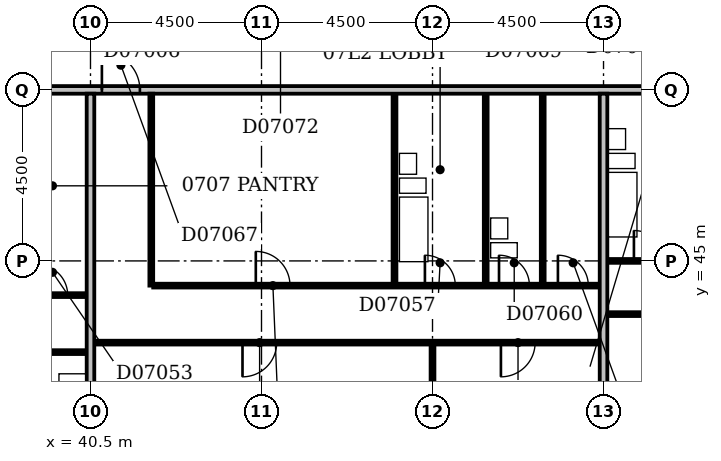
"""IFC4 building model, lengths in metres.
Left out: names, types, materials, properties, quantities, classifications, styles, units other than length and angle.
Written with IfcOpenShell. Run it as: python <this file> out.ifc"""

import sys

from ifc_helpers import new_model, si_unit, direction, frame, frame_2d, origin, place, context, subcontext, project, spatial, rectangle, extrude, element, fill, save


model = new_model("IFC4")
c1 = context("Model", 3, precision=1e-05, world=origin(), true_north=direction((0.0, 1.0)))
c2 = subcontext(c1, "Body", "Model", "MODEL_VIEW")
j1 = project(units=[si_unit("LENGTHUNIT", "METRE"), si_unit("PLANEANGLEUNIT", "RADIAN")], contexts=[c1])
p1 = place(None, origin())
s1 = spatial("IfcSite", under=j1, at=p1, CompositionType="ELEMENT")
p2 = place(p1, origin())
s2 = spatial("IfcBuilding", under=s1, at=p2, CompositionType="ELEMENT")
p3 = place(p2, frame((0.0, 0.0, 36.2)))
s3 = spatial("IfcBuildingStorey", under=s2, at=p3, CompositionType="ELEMENT", Elevation=36.2)
p4 = place(p3, frame((40.5, 36.6, 0.0), z_axis=(0.0, 0.0, 1.0), x_axis=(0.0, 1.0, 0.0)))
e1 = element("IfcWall", 1, at=p4, inside=s3, PredefinedType="PARTITIONING", context=c2, shape_type="SweptSolid", body=[
    extrude(rectangle(XDim=12.8, YDim=0.2, at=frame_2d((6.4, 0.0))), origin(), (0.0, 0.0, 1.0), 3.3),
])
p5 = place(p3, frame((49.5, 36.6, 0.0), z_axis=(0.0, 0.0, 1.0), x_axis=(0.0, 1.0, 0.0)))
e2 = element("IfcWall", 2, at=p5, inside=s3, PredefinedType="PARTITIONING", context=c2, shape_type="SweptSolid", body=[
    extrude(rectangle(XDim=6.2, YDim=0.1, at=frame_2d((3.1, 0.0))), origin(), (0.0, 0.0, 1.0), 3.3),
])
p6 = place(p3, frame((54.0, 36.6, 0.0), z_axis=(0.0, 0.0, 1.0), x_axis=(0.0, 1.0, 0.0)))
e3 = element("IfcWall", 3, at=p6, inside=s3, PredefinedType="PARTITIONING", context=c2, shape_type="SweptSolid", body=[
    extrude(rectangle(XDim=12.8, YDim=0.2, at=frame_2d((6.4, 0.0))), origin(), (0.0, 0.0, 1.0), 2.6),
])
p7 = place(p3, frame((22.6, 42.6, 0.0), z_axis=(0.0, 0.0, 1.0), x_axis=(1.0, 0.0, 0.0)))
e4 = element("IfcWall", 4, at=p7, inside=s3, PredefinedType="PARTITIONING", context=c2, shape_type="SweptSolid", body=[
    extrude(rectangle(XDim=17.8, YDim=0.1, at=frame_2d((8.9, 0.0))), origin(), (0.0, 0.0, 1.0), 3.3),
])
p8 = place(p7, frame((3.9, 0.0, 0.0)))
e5 = element("IfcOpeningElement", 5, at=p8, cuts=e4, PredefinedType="OPENING", context=c2, shape_type="SweptSolid", body=[
    extrude(rectangle(XDim=0.9, YDim=2.1, at=frame_2d((0.45, 1.05))), frame((0.0, 0.062, 0.0), z_axis=(0.0, -1.0, 0.0), x_axis=(1.0, 0.0, 0.0)), (0.0, 0.0, 1.0), 0.124),
])
p9 = place(p7, frame((10.7, 0.0, 0.0)))
e6 = element("IfcOpeningElement", 6, at=p9, cuts=e4, PredefinedType="OPENING", context=c2, shape_type="SweptSolid", body=[
    extrude(rectangle(XDim=0.9, YDim=2.1, at=frame_2d((0.45, 1.05))), frame((0.0, 0.062, 0.0), z_axis=(0.0, -1.0, 0.0), x_axis=(1.0, 0.0, 0.0)), (0.0, 0.0, 1.0), 0.124),
])
p10 = place(p7, frame((14.05, 0.0, 0.0)))
e7 = element("IfcOpeningElement", 7, at=p10, cuts=e4, PredefinedType="OPENING", context=c2, shape_type="SweptSolid", body=[
    extrude(rectangle(XDim=0.9, YDim=2.1, at=frame_2d((0.45, 1.05))), frame((0.0, 0.062, 0.0), z_axis=(0.0, -1.0, 0.0), x_axis=(1.0, 0.0, 0.0)), (0.0, 0.0, 1.0), 0.124),
])
p11 = place(p3, frame((40.6, 42.85, 0.0), z_axis=(0.0, 0.0, 1.0), x_axis=(1.0, 0.0, 0.0)))
e8 = element("IfcWall", 8, at=p11, inside=s3, PredefinedType="PARTITIONING", context=c2, shape_type="SweptSolid", body=[
    extrude(rectangle(XDim=13.3, YDim=0.1, at=frame_2d((6.65, 0.0))), origin(), (0.0, 0.0, 1.0), 3.3),
])
p12 = place(p11, frame((3.9, 0.0, 0.0)))
e9 = element("IfcOpeningElement", 9, at=p12, cuts=e8, PredefinedType="OPENING", context=c2, shape_type="SweptSolid", body=[
    extrude(rectangle(XDim=0.9, YDim=2.1, at=frame_2d((0.45, 1.05))), frame((0.0, 0.062, 0.0), z_axis=(0.0, -1.0, 0.0), x_axis=(1.0, 0.0, 0.0)), (0.0, 0.0, 1.0), 0.124),
])
p13 = place(p11, frame((10.7, 0.0, 0.0)))
e10 = element("IfcOpeningElement", 10, at=p13, cuts=e8, PredefinedType="OPENING", context=c2, shape_type="SweptSolid", body=[
    extrude(rectangle(XDim=0.9, YDim=2.1, at=frame_2d((0.45, 1.05))), frame((0.0, 0.062, 0.0), z_axis=(0.0, -1.0, 0.0), x_axis=(1.0, 0.0, 0.0)), (0.0, 0.0, 1.0), 0.124),
])
p14 = place(p3, frame((54.1, 43.6, 0.0), z_axis=(0.0, 0.0, 1.0), x_axis=(1.0, 0.0, 0.0)))
e11 = element("IfcWall", 11, at=p14, inside=s3, PredefinedType="PARTITIONING", context=c2, shape_type="SweptSolid", body=[
    extrude(rectangle(XDim=8.8, YDim=0.1, at=frame_2d((4.4, 0.0))), origin(), (0.0, 0.0, 1.0), 3.3),
])
p15 = place(p14, frame((1.7, 0.0, 0.0)))
e12 = element("IfcOpeningElement", 12, at=p15, cuts=e11, PredefinedType="OPENING", context=c2, shape_type="SweptSolid", body=[
    extrude(rectangle(XDim=0.9, YDim=2.1, at=frame_2d((0.45, 1.05))), frame((0.0, 0.062, 0.0), z_axis=(0.0, -1.0, 0.0), x_axis=(1.0, 0.0, 0.0)), (0.0, 0.0, 1.0), 0.124),
])
p16 = place(p14, frame((6.2, 0.0, 0.0)))
e13 = element("IfcOpeningElement", 13, at=p16, cuts=e11, PredefinedType="OPENING", context=c2, shape_type="SweptSolid", body=[
    extrude(rectangle(XDim=0.9, YDim=2.1, at=frame_2d((0.45, 1.05))), frame((0.0, 0.062, 0.0), z_axis=(0.0, -1.0, 0.0), x_axis=(1.0, 0.0, 0.0)), (0.0, 0.0, 1.0), 0.124),
])
p17 = place(p3, frame((31.05, 44.1, 0.0), z_axis=(0.0, 0.0, 1.0), x_axis=(1.0, 0.0, 0.0)))
e14 = element("IfcWall", 14, at=p17, inside=s3, PredefinedType="PARTITIONING", context=c2, shape_type="SweptSolid", body=[
    extrude(rectangle(XDim=9.35, YDim=0.1, at=frame_2d((4.675, 0.0))), origin(), (0.0, 0.0, 1.0), 3.3),
])
p18 = place(p17, frame((0.75, 0.0, 0.0)))
e15 = element("IfcOpeningElement", 15, at=p18, cuts=e14, PredefinedType="OPENING", context=c2, shape_type="SweptSolid", body=[
    extrude(rectangle(XDim=0.8, YDim=2.1, at=frame_2d((0.4, 1.05))), frame((0.0, 0.062, 0.0), z_axis=(0.0, -1.0, 0.0), x_axis=(1.0, 0.0, 0.0)), (0.0, 0.0, 1.0), 0.124),
])
p19 = place(p17, frame((8.05, 0.0, 0.0)))
e16 = element("IfcOpeningElement", 16, at=p19, cuts=e14, PredefinedType="OPENING", context=c2, shape_type="SweptSolid", body=[
    extrude(rectangle(XDim=0.8, YDim=2.1, at=frame_2d((0.4, 1.05))), frame((0.0, 0.062, 0.0), z_axis=(0.0, -1.0, 0.0), x_axis=(1.0, 0.0, 0.0)), (0.0, 0.0, 1.0), 0.124),
])
p20 = place(p17, frame((4.25, 0.0, 0.0)))
e17 = element("IfcOpeningElement", 17, at=p20, cuts=e14, PredefinedType="OPENING", context=c2, shape_type="SweptSolid", body=[
    extrude(rectangle(XDim=0.8, YDim=2.1, at=frame_2d((0.4, 1.05))), frame((0.0, 0.062, 0.0), z_axis=(0.0, -1.0, 0.0), x_axis=(1.0, 0.0, 0.0)), (0.0, 0.0, 1.0), 0.124),
])
p21 = place(p17, frame((6.05, 0.0, 0.0)))
e18 = element("IfcOpeningElement", 18, at=p21, cuts=e14, PredefinedType="OPENING", context=c2, shape_type="SweptSolid", body=[
    extrude(rectangle(XDim=0.8, YDim=2.1, at=frame_2d((0.4, 1.05))), frame((0.0, 0.062, 0.0), z_axis=(0.0, -1.0, 0.0), x_axis=(1.0, 0.0, 0.0)), (0.0, 0.0, 1.0), 0.124),
])
p22 = place(p17, frame((2.7, 0.0, 0.0)))
e19 = element("IfcOpeningElement", 19, at=p22, cuts=e14, PredefinedType="OPENING", context=c2, shape_type="SweptSolid", body=[
    extrude(rectangle(XDim=0.8, YDim=2.1, at=frame_2d((0.4, 1.05))), frame((0.0, 0.062, 0.0), z_axis=(0.0, -1.0, 0.0), x_axis=(1.0, 0.0, 0.0)), (0.0, 0.0, 1.0), 0.124),
])
p23 = place(p3, frame((42.1, 44.35, 0.0), z_axis=(0.0, 0.0, 1.0), x_axis=(0.0, 1.0, 0.0)))
e20 = element("IfcWall", 20, at=p23, inside=s3, PredefinedType="PARTITIONING", context=c2, shape_type="SweptSolid", body=[
    extrude(rectangle(XDim=5.05, YDim=0.1, at=frame_2d((2.525, 0.0))), origin(), (0.0, 0.0, 1.0), 3.3),
])
p24 = place(p3, frame((42.15, 44.35, 0.0), z_axis=(0.0, 0.0, 1.0), x_axis=(1.0, 0.0, 0.0)))
e21 = element("IfcWall", 21, at=p24, inside=s3, PredefinedType="PARTITIONING", context=c2, shape_type="SweptSolid", body=[
    extrude(rectangle(XDim=11.75, YDim=0.1, at=frame_2d((5.875, 0.0))), origin(), (0.0, 0.0, 1.0), 3.3),
])
p25 = place(p24, frame((7.15, 0.0, 0.0)))
e22 = element("IfcOpeningElement", 22, at=p25, cuts=e21, PredefinedType="OPENING", context=c2, shape_type="SweptSolid", body=[
    extrude(rectangle(XDim=0.8, YDim=2.1, at=frame_2d((0.4, 1.05))), frame((0.0, 0.062, 0.0), z_axis=(0.0, -1.0, 0.0), x_axis=(1.0, 0.0, 0.0)), (0.0, 0.0, 1.0), 0.124),
])
p26 = place(p24, frame((2.7, 0.0, 0.0)))
e23 = element("IfcOpeningElement", 23, at=p26, cuts=e21, PredefinedType="OPENING", context=c2, shape_type="SweptSolid", body=[
    extrude(rectangle(XDim=0.9, YDim=2.1, at=frame_2d((0.45, 1.05))), frame((0.0, 0.062, 0.0), z_axis=(0.0, -1.0, 0.0), x_axis=(1.0, 0.0, 0.0)), (0.0, 0.0, 1.0), 0.124),
])
p27 = place(p24, frame((10.65, 0.0, 0.0)))
e24 = element("IfcOpeningElement", 24, at=p27, cuts=e21, PredefinedType="OPENING", context=c2, shape_type="SweptSolid", body=[
    extrude(rectangle(XDim=0.8, YDim=2.1, at=frame_2d((0.4, 1.05))), frame((0.0, 0.062, 0.0), z_axis=(0.0, -1.0, 0.0), x_axis=(1.0, 0.0, 0.0)), (0.0, 0.0, 1.0), 0.124),
])
p28 = place(p24, frame((9.1, 0.0, 0.0)))
e25 = element("IfcOpeningElement", 25, at=p28, cuts=e21, PredefinedType="OPENING", context=c2, shape_type="SweptSolid", body=[
    extrude(rectangle(XDim=0.8, YDim=2.1, at=frame_2d((0.4, 1.05))), frame((0.0, 0.062, 0.0), z_axis=(0.0, -1.0, 0.0), x_axis=(1.0, 0.0, 0.0)), (0.0, 0.0, 1.0), 0.124),
])
for number, where, z_axis, x_axis in (
    (26, (48.5, 44.4, 0.0), (0.0, 0.0, 1.0), (0.0, 1.0, 0.0)),
    (27, (50.9, 44.4, 0.0), (0.0, 0.0, 1.0), (0.0, 1.0, 0.0)),
    (28, (52.4, 44.4, 0.0), (0.0, 0.0, 1.0), (0.0, 1.0, 0.0)),
):
    element("IfcWall", number, at=place(p3, frame(where, z_axis=z_axis, x_axis=x_axis)), inside=s3, PredefinedType="PLUMBINGWALL", context=c2, shape_type="SweptSolid", body=[
        extrude(rectangle(XDim=5.0, YDim=0.1, at=frame_2d((2.5, 0.0))), origin(), (0.0, 0.0, 1.0), 3.3),
    ])
p29 = place(p3, frame((54.1, 45.0, 0.0), z_axis=(0.0, 0.0, 1.0), x_axis=(1.0, 0.0, 0.0)))
e29 = element("IfcWall", 29, at=p29, inside=s3, PredefinedType="PARTITIONING", context=c2, shape_type="SweptSolid", body=[
    extrude(rectangle(XDim=2.25, YDim=0.1, at=frame_2d((1.125, 0.0))), origin(), (0.0, 0.0, 1.0), 3.3),
])
p30 = place(p29, frame((0.7, 0.0, 0.0)))
e30 = element("IfcOpeningElement", 30, at=p30, cuts=e29, PredefinedType="OPENING", context=c2, shape_type="SweptSolid", body=[
    extrude(rectangle(XDim=0.8, YDim=2.1, at=frame_2d((0.4, 1.05))), frame((0.0, 0.062, 0.0), z_axis=(0.0, -1.0, 0.0), x_axis=(1.0, 0.0, 0.0)), (0.0, 0.0, 1.0), 0.124),
])
p31 = place(p3, frame((9.1, 49.5, 0.0), z_axis=(0.0, 0.0, 1.0), x_axis=(1.0, 0.0, 0.0)))
e31 = element("IfcWall", 31, at=p31, inside=s3, PredefinedType="PARTITIONING", context=c2, shape_type="SweptSolid", body=[
    extrude(rectangle(XDim=57.8, YDim=0.2, at=frame_2d((28.9, 0.0))), origin(), (0.0, 0.0, 1.0), 3.3),
])
p32 = place(p31, frame((20.6, 0.0, 0.0)))
e32 = element("IfcOpeningElement", 32, at=p32, cuts=e31, PredefinedType="OPENING", context=c2, shape_type="SweptSolid", body=[
    extrude(rectangle(XDim=1.0, YDim=2.1, at=frame_2d((0.5, 1.05))), frame((0.0, 0.112, 0.0), z_axis=(0.0, -1.0, 0.0), x_axis=(1.0, 0.0, 0.0)), (0.0, 0.0, 1.0), 0.224),
])
p33 = place(p31, frame((31.7, 0.0, 0.0)))
e33 = element("IfcOpeningElement", 33, at=p33, cuts=e31, PredefinedType="OPENING", context=c2, shape_type="SweptSolid", body=[
    extrude(rectangle(XDim=1.0, YDim=2.1, at=frame_2d((0.5, 1.05))), frame((0.0, 0.112, 0.0), z_axis=(0.0, -1.0, 0.0), x_axis=(1.0, 0.0, 0.0)), (0.0, 0.0, 1.0), 0.224),
])
p34 = place(p31, frame((47.6, 0.0, 0.0)))
e34 = element("IfcOpeningElement", 34, at=p34, cuts=e31, PredefinedType="OPENING", context=c2, shape_type="SweptSolid", body=[
    extrude(rectangle(XDim=1.0, YDim=2.1, at=frame_2d((0.5, 1.05))), frame((0.0, 0.112, 0.0), z_axis=(0.0, -1.0, 0.0), x_axis=(1.0, 0.0, 0.0)), (0.0, 0.0, 1.0), 0.224),
])
p35 = place(p31, frame((54.15, 0.0, 0.0)))
e35 = element("IfcOpeningElement", 35, at=p35, cuts=e31, PredefinedType="OPENING", context=c2, shape_type="SweptSolid", body=[
    extrude(rectangle(XDim=1.0, YDim=2.1, at=frame_2d((0.5, 1.05))), frame((0.0, 0.112, 0.0), z_axis=(0.0, -1.0, 0.0), x_axis=(1.0, 0.0, 0.0)), (0.0, 0.0, 1.0), 0.224),
])
p36 = place(p31, frame((10.65, 0.0, 0.0)))
e36 = element("IfcOpeningElement", 36, at=p36, cuts=e31, PredefinedType="OPENING", context=c2, shape_type="SweptSolid", body=[
    extrude(rectangle(XDim=0.9, YDim=2.1, at=frame_2d((0.45, 1.05))), frame((0.0, 0.112, 0.0), z_axis=(0.0, -1.0, 0.0), x_axis=(1.0, 0.0, 0.0)), (0.0, 0.0, 1.0), 0.224),
])
p37 = place(p12, frame((0.9, 0.0, 0.0), z_axis=(0.0, 0.0, 1.0), x_axis=(-1.0, 0.0, 0.0)))
e37 = element("IfcDoor", 37, at=p37, inside=s3, OperationType="SINGLE_SWING_RIGHT", PredefinedType="DOOR", context=c2, shape_type="SweptSolid", body=[
    extrude(rectangle(XDim=0.9, YDim=2.1, at=frame_2d((0.45, 1.05))), frame((0.0, 0.025, 0.0), z_axis=(0.0, -1.0, 0.0), x_axis=(1.0, 0.0, 0.0)), (0.0, 0.0, 1.0), 0.05),
])
fill(e9, e37)
p38 = place(p13, frame((0.9, 0.0, 0.0), z_axis=(0.0, 0.0, 1.0), x_axis=(-1.0, 0.0, 0.0)))
e38 = element("IfcDoor", 38, at=p38, inside=s3, OperationType="SINGLE_SWING_RIGHT", PredefinedType="DOOR", context=c2, shape_type="SweptSolid", body=[
    extrude(rectangle(XDim=0.9, YDim=2.1, at=frame_2d((0.45, 1.05))), frame((0.0, 0.025, 0.0), z_axis=(0.0, -1.0, 0.0), x_axis=(1.0, 0.0, 0.0)), (0.0, 0.0, 1.0), 0.05),
])
fill(e10, e38)
p39 = place(p19, origin())
e39 = element("IfcDoor", 39, at=p39, inside=s3, OperationType="SINGLE_SWING_LEFT", PredefinedType="DOOR", context=c2, shape_type="SweptSolid", body=[
    extrude(rectangle(XDim=0.8, YDim=2.1, at=frame_2d((0.4, 1.05))), frame((0.0, 0.025, 0.0), z_axis=(0.0, -1.0, 0.0), x_axis=(1.0, 0.0, 0.0)), (0.0, 0.0, 1.0), 0.05),
])
fill(e16, e39)
p40 = place(p25, origin())
e40 = element("IfcDoor", 40, at=p40, inside=s3, OperationType="SINGLE_SWING_LEFT", PredefinedType="DOOR", context=c2, shape_type="SweptSolid", body=[
    extrude(rectangle(XDim=0.8, YDim=2.1, at=frame_2d((0.4, 1.05))), frame((0.0, 0.025, 0.0), z_axis=(0.0, -1.0, 0.0), x_axis=(1.0, 0.0, 0.0)), (0.0, 0.0, 1.0), 0.05),
])
fill(e22, e40)
p41 = place(p26, origin())
e41 = element("IfcDoor", 41, at=p41, inside=s3, OperationType="SINGLE_SWING_LEFT", PredefinedType="DOOR", context=c2, shape_type="SweptSolid", body=[
    extrude(rectangle(XDim=0.9, YDim=2.1, at=frame_2d((0.45, 1.05))), frame((0.0, 0.025, 0.0), z_axis=(0.0, -1.0, 0.0), x_axis=(1.0, 0.0, 0.0)), (0.0, 0.0, 1.0), 0.05),
])
fill(e23, e41)
p42 = place(p27, origin())
e42 = element("IfcDoor", 42, at=p42, inside=s3, OperationType="SINGLE_SWING_LEFT", PredefinedType="DOOR", context=c2, shape_type="SweptSolid", body=[
    extrude(rectangle(XDim=0.8, YDim=2.1, at=frame_2d((0.4, 1.05))), frame((0.0, 0.025, 0.0), z_axis=(0.0, -1.0, 0.0), x_axis=(1.0, 0.0, 0.0)), (0.0, 0.0, 1.0), 0.05),
])
fill(e24, e42)
p43 = place(p28, origin())
e43 = element("IfcDoor", 43, at=p43, inside=s3, OperationType="SINGLE_SWING_LEFT", PredefinedType="DOOR", context=c2, shape_type="SweptSolid", body=[
    extrude(rectangle(XDim=0.8, YDim=2.1, at=frame_2d((0.4, 1.05))), frame((0.0, 0.025, 0.0), z_axis=(0.0, -1.0, 0.0), x_axis=(1.0, 0.0, 0.0)), (0.0, 0.0, 1.0), 0.05),
])
fill(e25, e43)
p44 = place(p30, origin())
e44 = element("IfcDoor", 44, at=p44, inside=s3, OperationType="SINGLE_SWING_LEFT", PredefinedType="DOOR", context=c2, shape_type="SweptSolid", body=[
    extrude(rectangle(XDim=0.8, YDim=2.1, at=frame_2d((0.4, 1.05))), frame((0.0, 0.025, 0.0), z_axis=(0.0, -1.0, 0.0), x_axis=(1.0, 0.0, 0.0)), (0.0, 0.0, 1.0), 0.05),
])
fill(e30, e44)
p45 = place(p33, origin())
e45 = element("IfcDoor", 45, at=p45, inside=s3, OperationType="SINGLE_SWING_LEFT", PredefinedType="DOOR", context=c2, shape_type="SweptSolid", body=[
    extrude(rectangle(XDim=1.0, YDim=2.1, at=frame_2d((0.5, 1.05))), frame((0.0, 0.025, 0.0), z_axis=(0.0, -1.0, 0.0), x_axis=(1.0, 0.0, 0.0)), (0.0, 0.0, 1.0), 0.05),
])
fill(e33, e45)
save(model, sys.argv[1])
